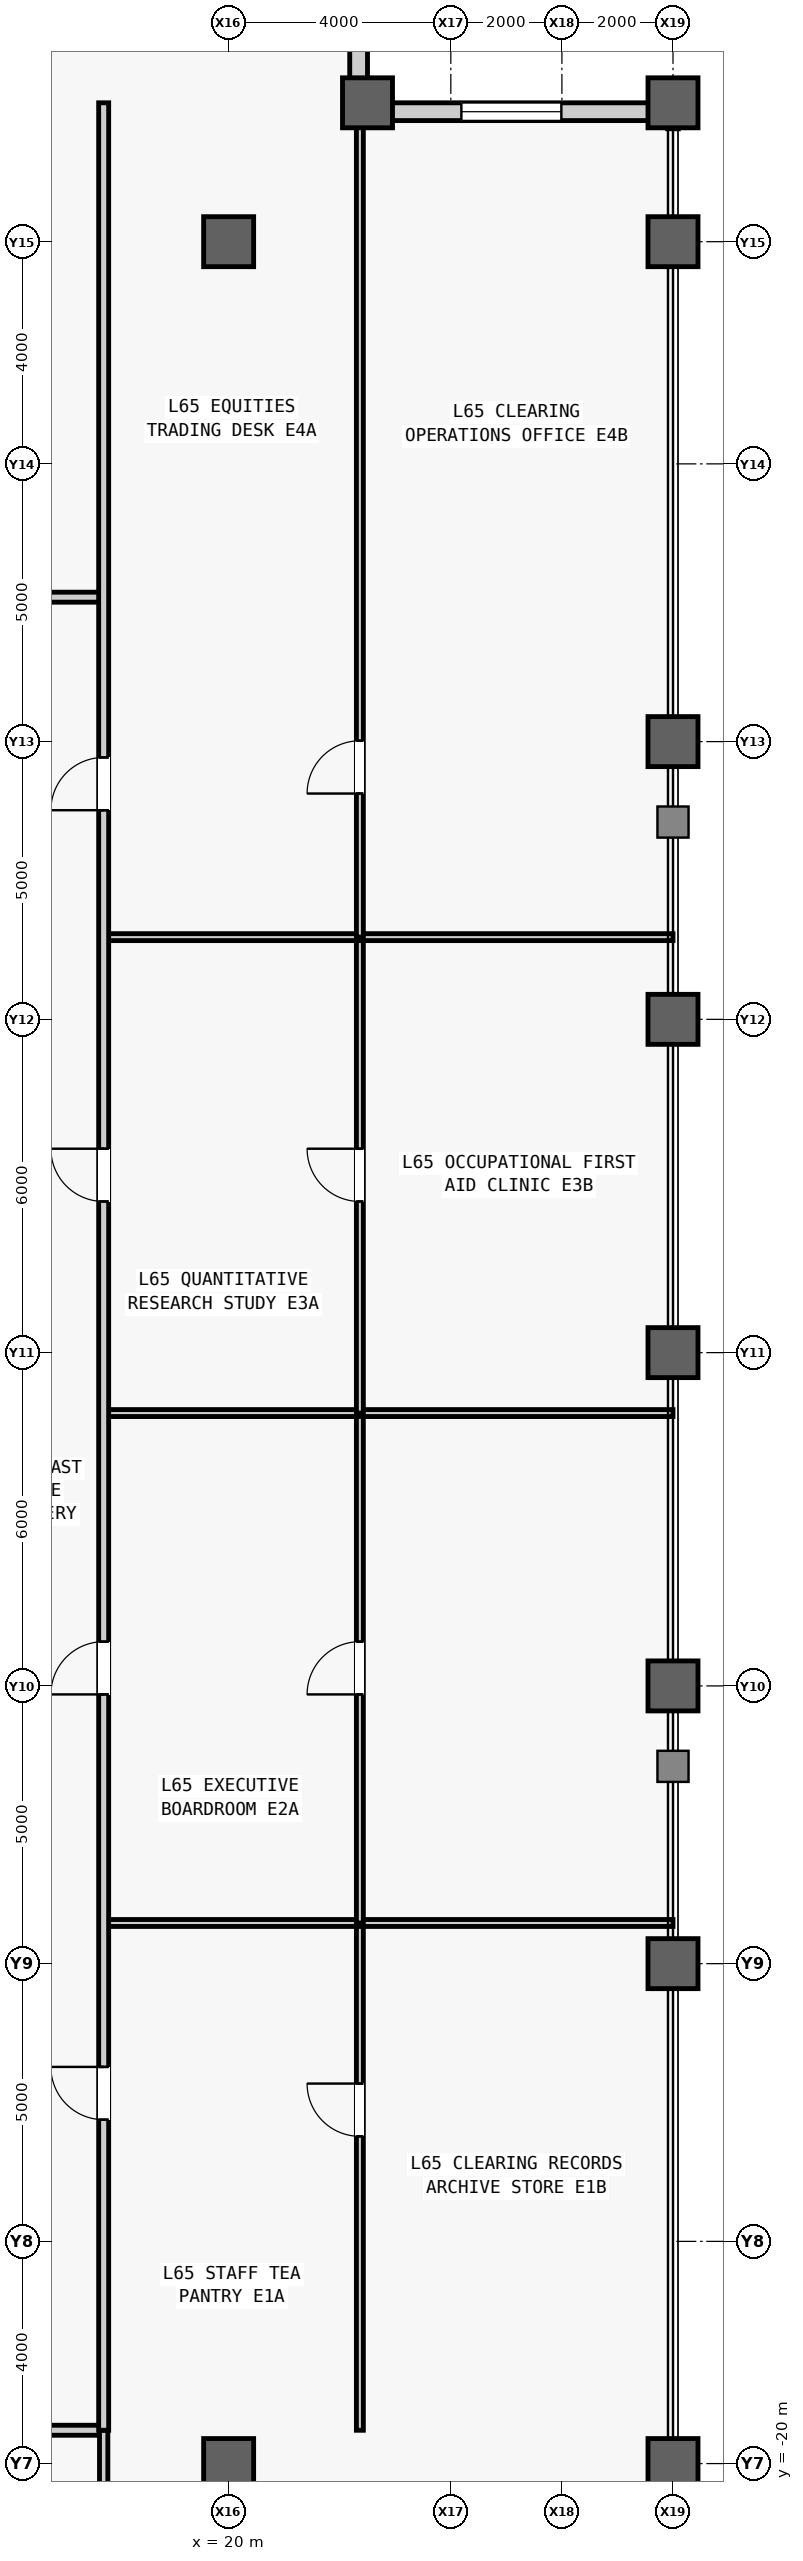
"""IFC4 building model, lengths in metres.
Left out: names, types, materials, properties, quantities, classifications, styles, units other than length and angle.
Written with IfcOpenShell. Run it as: python <this file> out.ifc"""

import sys

from ifc_helpers import new_model, si_unit, direction, frame, frame_2d, origin, origin_2d, place, context, subcontext, project, spatial, rectangle, hollow_rectangle, extrude, source, transform, mapped, element, fill, save


model = new_model("IFC4")
c1 = context("Model", 3, precision=1e-05, world=origin(), true_north=direction((0.0, 1.0)))
c2 = subcontext(c1, "Body", "Model", "MODEL_VIEW")
j1 = project(units=[si_unit("LENGTHUNIT", "METRE"), si_unit("PLANEANGLEUNIT", "RADIAN")], contexts=[c1])
p1 = place(None, origin())
s1 = spatial("IfcSite", under=j1, at=p1, CompositionType="ELEMENT")
p2 = place(p1, origin())
s2 = spatial("IfcBuilding", under=s1, at=p2, CompositionType="ELEMENT")
p3 = place(p2, frame((0.0, 0.0, 277.5)))
s3 = spatial("IfcBuildingStorey", under=s2, at=p3, CompositionType="ELEMENT", Elevation=277.5)
m1 = source(origin(), c2, "Body", "SweptSolid", [
    extrude(hollow_rectangle(XDim=0.9, YDim=0.9, WallThickness=0.05, at=origin_2d()), origin(), (0.0, 0.0, 1.0), 4.0),
])
for number, where, z_axis, x_axis in (
    (1, (20.0, -20.0, 0.0), (0.0, 0.0, 1.0), (1.0, 0.0, 0.0)),
    (2, (20.0, 20.0, 0.0), (0.0, 0.0, 1.0), (1.0, 0.0, 0.0)),
    (3, (22.5, 22.5, 0.0), (0.0, 0.0, 1.0), (1.0, 0.0, 0.0)),
    (4, (28.0, -20.0, 0.0), (0.0, 0.0, 1.0), (1.0, 0.0, 0.0)),
    (5, (28.0, -11.0, 0.0), (0.0, 0.0, 1.0), (1.0, 0.0, 0.0)),
    (6, (28.0, -6.0, 0.0), (0.0, 0.0, 1.0), (1.0, 0.0, 0.0)),
    (7, (28.0, 0.0, 0.0), (0.0, 0.0, 1.0), (1.0, 0.0, 0.0)),
    (8, (28.0, 6.0, 0.0), (0.0, 0.0, 1.0), (1.0, 0.0, 0.0)),
    (9, (28.0, 11.0, 0.0), (0.0, 0.0, 1.0), (1.0, 0.0, 0.0)),
    (10, (28.0, 20.0, 0.0), (0.0, 0.0, 1.0), (1.0, 0.0, 0.0)),
    (11, (28.0, 22.5, 0.0), (0.0, 0.0, 1.0), (1.0, 0.0, 0.0)),
):
    element("IfcColumn", number, at=place(p3, frame(where, z_axis=z_axis, x_axis=x_axis)), inside=s3, PredefinedType="COLUMN", context=c2, shape_type="MappedRepresentation", body=[
        mapped(m1, transform((0.0, 0.0, 0.0), scale=1.0)),
    ])
m2 = source(origin(), c2, "Body", "SweptSolid", [
    extrude(rectangle(XDim=5.18, YDim=0.32, at=frame_2d((2.59, 0.0))), origin(), (0.0, 0.0, 1.0), 3.231),
])
p4 = place(p3, frame((22.5, 22.34, 0.0), z_axis=(0.0, 0.0, 1.0), x_axis=(1.0, 0.0, 0.0)))
e12 = element("IfcWall", 12, at=p4, inside=s3, PredefinedType="STANDARD", context=c2, shape_type="MappedRepresentation", body=[
    mapped(m2, transform((0.0, 0.0, 0.0), scale=1.0)),
])
m3 = source(origin(), c2, "Body", "SweptSolid", [
    extrude(rectangle(XDim=1.8, YDim=2.4, at=frame_2d((0.9, 1.2))), frame((0.0, 0.17, 0.0), z_axis=(0.0, -1.0, 0.0), x_axis=(1.0, 0.0, 0.0)), (0.0, 0.0, 1.0), 0.34),
])
p5 = place(p4, frame((1.69, 0.0, 0.5)))
e13 = element("IfcOpeningElement", 13, at=p5, cuts=e12, PredefinedType="OPENING", context=c2, shape_type="MappedRepresentation", body=[
    mapped(m3, transform((0.0, 0.0, 0.0), scale=1.0)),
])
p6 = place(p3, frame((22.34, 22.5, 0.0), z_axis=(0.0, 0.0, 1.0), x_axis=(0.0, 1.0, 0.0)))
e14 = element("IfcWall", 14, at=p6, inside=s3, PredefinedType="STANDARD", context=c2, shape_type="MappedRepresentation", body=[
    mapped(m2, transform((0.0, 0.0, 0.0), scale=1.0)),
])
p7 = place(p6, frame((1.69, 0.0, 0.5)))
e15 = element("IfcOpeningElement", 15, at=p7, cuts=e14, PredefinedType="OPENING", context=c2, shape_type="MappedRepresentation", body=[
    mapped(m3, transform((0.0, 0.0, 0.0), scale=1.0)),
])
m4 = source(origin(), c2, "Body", "SweptSolid", [
    extrude(rectangle(XDim=2.4, YDim=0.18, at=frame_2d((1.2, 0.0))), origin(), (0.0, 0.0, 1.0), 3.78),
])
p8 = place(p3, frame((15.35, 13.6, 0.0), z_axis=(0.0, 0.0, 1.0), x_axis=(1.0, 0.0, 0.0)))
e16 = element("IfcWall", 16, at=p8, inside=s3, PredefinedType="PARTITIONING", context=c2, shape_type="MappedRepresentation", body=[
    mapped(m4, transform((0.0, 0.0, 0.0), scale=1.0)),
])
m5 = source(origin(), c2, "Body", "SweptSolid", [
    extrude(rectangle(XDim=37.55, YDim=0.18, at=frame_2d((18.775, 0.0))), origin(), (0.0, 0.0, 1.0), 3.433),
])
p9 = place(p3, frame((-19.8, -19.4, 0.0), z_axis=(0.0, 0.0, 1.0), x_axis=(1.0, 0.0, 0.0)))
e17 = element("IfcWall", 17, at=p9, inside=s3, PredefinedType="PARTITIONING", context=c2, shape_type="MappedRepresentation", body=[
    mapped(m5, transform((0.0, 0.0, 0.0), scale=1.0)),
])
m6 = source(origin(), c2, "Body", "SweptSolid", [
    extrude(rectangle(XDim=1.05, YDim=2.2, at=frame_2d((0.525, 1.1))), frame((0.0, 0.1, 0.0), z_axis=(0.0, -1.0, 0.0), x_axis=(1.0, 0.0, 0.0)), (0.0, 0.0, 1.0), 0.2),
])
p10 = place(p9, frame((3.354, 0.0, 0.0)))
e18 = element("IfcOpeningElement", 18, at=p10, cuts=e17, PredefinedType="OPENING", context=c2, shape_type="MappedRepresentation", body=[
    mapped(m6, transform((0.0, 0.0, 0.0), scale=1.0)),
])
p11 = place(p9, frame((10.74, 0.0, 0.0)))
e19 = element("IfcOpeningElement", 19, at=p11, cuts=e17, PredefinedType="OPENING", context=c2, shape_type="MappedRepresentation", body=[
    mapped(m6, transform((0.0, 0.0, 0.0), scale=1.0)),
])
p12 = place(p9, frame((20.127, 0.0, 0.0)))
e20 = element("IfcOpeningElement", 20, at=p12, cuts=e17, PredefinedType="OPENING", context=c2, shape_type="MappedRepresentation", body=[
    mapped(m6, transform((0.0, 0.0, 0.0), scale=1.0)),
])
p13 = place(p9, frame((28.388, 0.0, 0.0)))
e21 = element("IfcOpeningElement", 21, at=p13, cuts=e17, PredefinedType="OPENING", context=c2, shape_type="MappedRepresentation", body=[
    mapped(m6, transform((0.0, 0.0, 0.0), scale=1.0)),
])
p14 = place(p9, frame((33.872, 0.0, 0.0)))
e22 = element("IfcOpeningElement", 22, at=p14, cuts=e17, PredefinedType="OPENING", context=c2, shape_type="MappedRepresentation", body=[
    mapped(m6, transform((0.0, 0.0, 0.0), scale=1.0)),
])
m7 = source(origin(), c2, "Body", "SweptSolid", [
    extrude(rectangle(XDim=8.6, YDim=0.15, at=frame_2d((4.3, 0.0))), origin(), (0.0, 0.0, 1.0), 3.78),
])
p15 = place(p3, frame((17.75, -28.0, 0.0), z_axis=(0.0, 0.0, 1.0), x_axis=(0.0, 1.0, 0.0)))
e23 = element("IfcWall", 23, at=p15, inside=s3, PredefinedType="PARTITIONING", context=c2, shape_type="MappedRepresentation", body=[
    mapped(m7, transform((0.0, 0.0, 0.0), scale=1.0)),
])
m8 = source(origin(), c2, "Body", "SweptSolid", [
    extrude(rectangle(XDim=9.132, YDim=0.125, at=frame_2d((4.566, 0.0))), origin(), (0.0, 0.0, 1.0), 3.164),
])
p16 = place(p3, frame((22.363, -19.4, 0.0), z_axis=(0.0, 0.0, 1.0), x_axis=(0.0, 1.0, 0.0)))
e24 = element("IfcWall", 24, at=p16, inside=s3, PredefinedType="PARTITIONING", context=c2, shape_type="MappedRepresentation", body=[
    mapped(m8, transform((0.0, 0.0, 0.0), scale=1.0)),
])
m9 = source(origin(), c2, "Body", "SweptSolid", [
    extrude(rectangle(XDim=0.95, YDim=2.15, at=frame_2d((0.475, 1.075))), frame((0.0, 0.073, 0.0), z_axis=(0.0, -1.0, 0.0), x_axis=(1.0, 0.0, 0.0)), (0.0, 0.0, 1.0), 0.145),
])
p17 = place(p16, frame((5.291, 0.0, 0.0)))
e25 = element("IfcOpeningElement", 25, at=p17, cuts=e24, PredefinedType="OPENING", context=c2, shape_type="MappedRepresentation", body=[
    mapped(m9, transform((0.0, 0.0, 0.0), scale=1.0)),
])
m10 = source(origin(), c2, "Body", "SweptSolid", [
    extrude(rectangle(XDim=10.25, YDim=0.125, at=frame_2d((5.125, 0.0))), origin(), (0.0, 0.0, 1.0), 3.78),
])
p18 = place(p3, frame((17.75, -10.268, 0.0), z_axis=(0.0, 0.0, 1.0), x_axis=(1.0, 0.0, 0.0)))
e26 = element("IfcWall", 26, at=p18, inside=s3, PredefinedType="PARTITIONING", context=c2, shape_type="MappedRepresentation", body=[
    mapped(m10, transform((0.0, 0.0, 0.0), scale=1.0)),
])
m11 = source(origin(), c2, "Body", "SweptSolid", [
    extrude(rectangle(XDim=9.18, YDim=0.125, at=frame_2d((4.59, 0.0))), origin(), (0.0, 0.0, 1.0), 3.78),
])
p19 = place(p3, frame((22.363, -10.268, 0.0), z_axis=(0.0, 0.0, 1.0), x_axis=(0.0, 1.0, 0.0)))
e27 = element("IfcWall", 27, at=p19, inside=s3, PredefinedType="PARTITIONING", context=c2, shape_type="MappedRepresentation", body=[
    mapped(m11, transform((0.0, 0.0, 0.0), scale=1.0)),
])
p20 = place(p19, frame((4.115, 0.0, 0.0)))
e28 = element("IfcOpeningElement", 28, at=p20, cuts=e27, PredefinedType="OPENING", context=c2, shape_type="MappedRepresentation", body=[
    mapped(m9, transform((0.0, 0.0, 0.0), scale=1.0)),
])
p21 = place(p3, frame((17.75, -1.088, 0.0), z_axis=(0.0, 0.0, 1.0), x_axis=(1.0, 0.0, 0.0)))
e29 = element("IfcWall", 29, at=p21, inside=s3, PredefinedType="PARTITIONING", context=c2, shape_type="MappedRepresentation", body=[
    mapped(m10, transform((0.0, 0.0, 0.0), scale=1.0)),
])
m12 = source(origin(), c2, "Body", "SweptSolid", [
    extrude(rectangle(XDim=8.568, YDim=0.125, at=frame_2d((4.284, 0.0))), origin(), (0.0, 0.0, 1.0), 3.78),
])
p22 = place(p3, frame((22.363, -1.088, 0.0), z_axis=(0.0, 0.0, 1.0), x_axis=(0.0, 1.0, 0.0)))
e30 = element("IfcWall", 30, at=p22, inside=s3, PredefinedType="PARTITIONING", context=c2, shape_type="MappedRepresentation", body=[
    mapped(m12, transform((0.0, 0.0, 0.0), scale=1.0)),
])
p23 = place(p22, frame((3.809, 0.0, 0.0)))
e31 = element("IfcOpeningElement", 31, at=p23, cuts=e30, PredefinedType="OPENING", context=c2, shape_type="MappedRepresentation", body=[
    mapped(m9, transform((0.0, 0.0, 0.0), scale=1.0)),
])
p24 = place(p3, frame((17.75, 7.48, 0.0), z_axis=(0.0, 0.0, 1.0), x_axis=(1.0, 0.0, 0.0)))
e32 = element("IfcWall", 32, at=p24, inside=s3, PredefinedType="PARTITIONING", context=c2, shape_type="MappedRepresentation", body=[
    mapped(m10, transform((0.0, 0.0, 0.0), scale=1.0)),
])
m13 = source(origin(), c2, "Body", "SweptSolid", [
    extrude(rectangle(XDim=15.02, YDim=0.125, at=frame_2d((7.51, 0.0))), origin(), (0.0, 0.0, 1.0), 3.164),
])
p25 = place(p3, frame((22.363, 7.48, 0.0), z_axis=(0.0, 0.0, 1.0), x_axis=(0.0, 1.0, 0.0)))
e33 = element("IfcWall", 33, at=p25, inside=s3, PredefinedType="PARTITIONING", context=c2, shape_type="MappedRepresentation", body=[
    mapped(m13, transform((0.0, 0.0, 0.0), scale=1.0)),
])
p26 = place(p25, frame((2.585, 0.0, 0.0)))
e34 = element("IfcOpeningElement", 34, at=p26, cuts=e33, PredefinedType="OPENING", context=c2, shape_type="MappedRepresentation", body=[
    mapped(m9, transform((0.0, 0.0, 0.0), scale=1.0)),
])
m14 = source(origin(), c2, "Body", "SweptSolid", [
    extrude(rectangle(XDim=41.9, YDim=0.18, at=frame_2d((20.95, 0.0))), origin(), (0.0, 0.0, 1.0), 3.78),
])
p27 = place(p3, frame((17.75, -19.4, 0.0), z_axis=(0.0, 0.0, 1.0), x_axis=(0.0, 1.0, 0.0)))
e35 = element("IfcWall", 35, at=p27, inside=s3, PredefinedType="PARTITIONING", context=c2, shape_type="MappedRepresentation", body=[
    mapped(m14, transform((0.0, 0.0, 0.0), scale=1.0)),
])
m15 = source(origin(), c2, "Body", "SweptSolid", [
    extrude(rectangle(XDim=0.95, YDim=2.15, at=frame_2d((0.475, 1.075))), frame((0.0, 0.1, 0.0), z_axis=(0.0, -1.0, 0.0), x_axis=(1.0, 0.0, 0.0)), (0.0, 0.0, 1.0), 0.2),
])
p28 = place(p27, frame((5.591, 0.0, 0.0)))
e36 = element("IfcOpeningElement", 36, at=p28, cuts=e35, PredefinedType="OPENING", context=c2, shape_type="MappedRepresentation", body=[
    mapped(m15, transform((0.0, 0.0, 0.0), scale=1.0)),
])
p29 = place(p27, frame((13.247, 0.0, 0.0)))
e37 = element("IfcOpeningElement", 37, at=p29, cuts=e35, PredefinedType="OPENING", context=c2, shape_type="MappedRepresentation", body=[
    mapped(m15, transform((0.0, 0.0, 0.0), scale=1.0)),
])
p30 = place(p27, frame((22.121, 0.0, 0.0)))
e38 = element("IfcOpeningElement", 38, at=p30, cuts=e35, PredefinedType="OPENING", context=c2, shape_type="MappedRepresentation", body=[
    mapped(m15, transform((0.0, 0.0, 0.0), scale=1.0)),
])
p31 = place(p27, frame((29.165, 0.0, 0.0)))
e39 = element("IfcOpeningElement", 39, at=p31, cuts=e35, PredefinedType="OPENING", context=c2, shape_type="MappedRepresentation", body=[
    mapped(m15, transform((0.0, 0.0, 0.0), scale=1.0)),
])
m16 = source(origin(), c2, "Body", "SweptSolid", [
    extrude(rectangle(XDim=1.8, YDim=2.4, at=frame_2d((0.9, 1.2))), frame((0.0, 0.03, 0.0), z_axis=(0.0, -1.0, 0.0), x_axis=(1.0, 0.0, 0.0)), (0.0, 0.0, 1.0), 0.06),
])
p32 = place(p5, origin())
e40 = element("IfcWindow", 40, at=p32, inside=s3, PartitioningType="SINGLE_PANEL", PredefinedType="WINDOW", context=c2, shape_type="MappedRepresentation", body=[
    mapped(m16, transform((0.0, 0.0, 0.0), scale=1.0)),
])
fill(e13, e40)
m17 = source(origin(), c2, "Body", "SweptSolid", [
    extrude(rectangle(XDim=0.95, YDim=2.15, at=frame_2d((0.475, 1.075))), frame((0.0, 0.025, 0.0), z_axis=(0.0, -1.0, 0.0), x_axis=(1.0, 0.0, 0.0)), (0.0, 0.0, 1.0), 0.05),
])
p33 = place(p17, origin())
e41 = element("IfcDoor", 41, at=p33, inside=s3, OperationType="SINGLE_SWING_RIGHT", PredefinedType="DOOR", context=c2, shape_type="MappedRepresentation", body=[
    mapped(m17, transform((0.0, 0.0, 0.0), scale=1.0)),
])
fill(e25, e41)
p34 = place(p20, origin())
e42 = element("IfcDoor", 42, at=p34, inside=s3, OperationType="SINGLE_SWING_LEFT", PredefinedType="DOOR", context=c2, shape_type="MappedRepresentation", body=[
    mapped(m17, transform((0.0, 0.0, 0.0), scale=1.0)),
])
fill(e28, e42)
p35 = place(p23, origin())
e43 = element("IfcDoor", 43, at=p35, inside=s3, OperationType="SINGLE_SWING_RIGHT", PredefinedType="DOOR", context=c2, shape_type="MappedRepresentation", body=[
    mapped(m17, transform((0.0, 0.0, 0.0), scale=1.0)),
])
fill(e31, e43)
p36 = place(p26, origin())
e44 = element("IfcDoor", 44, at=p36, inside=s3, OperationType="SINGLE_SWING_LEFT", PredefinedType="DOOR", context=c2, shape_type="MappedRepresentation", body=[
    mapped(m17, transform((0.0, 0.0, 0.0), scale=1.0)),
])
fill(e34, e44)
p37 = place(p28, origin())
e45 = element("IfcDoor", 45, at=p37, inside=s3, OperationType="SINGLE_SWING_RIGHT", PredefinedType="DOOR", context=c2, shape_type="MappedRepresentation", body=[
    mapped(m17, transform((0.0, 0.0, 0.0), scale=1.0)),
])
fill(e36, e45)
p38 = place(p29, origin())
e46 = element("IfcDoor", 46, at=p38, inside=s3, OperationType="SINGLE_SWING_LEFT", PredefinedType="DOOR", context=c2, shape_type="MappedRepresentation", body=[
    mapped(m17, transform((0.0, 0.0, 0.0), scale=1.0)),
])
fill(e37, e46)
p39 = place(p30, origin())
e47 = element("IfcDoor", 47, at=p39, inside=s3, OperationType="SINGLE_SWING_RIGHT", PredefinedType="DOOR", context=c2, shape_type="MappedRepresentation", body=[
    mapped(m17, transform((0.0, 0.0, 0.0), scale=1.0)),
])
fill(e38, e47)
p40 = place(p31, origin())
e48 = element("IfcDoor", 48, at=p40, inside=s3, OperationType="SINGLE_SWING_LEFT", PredefinedType="DOOR", context=c2, shape_type="MappedRepresentation", body=[
    mapped(m17, transform((0.0, 0.0, 0.0), scale=1.0)),
])
fill(e39, e48)
save(model, sys.argv[1])
